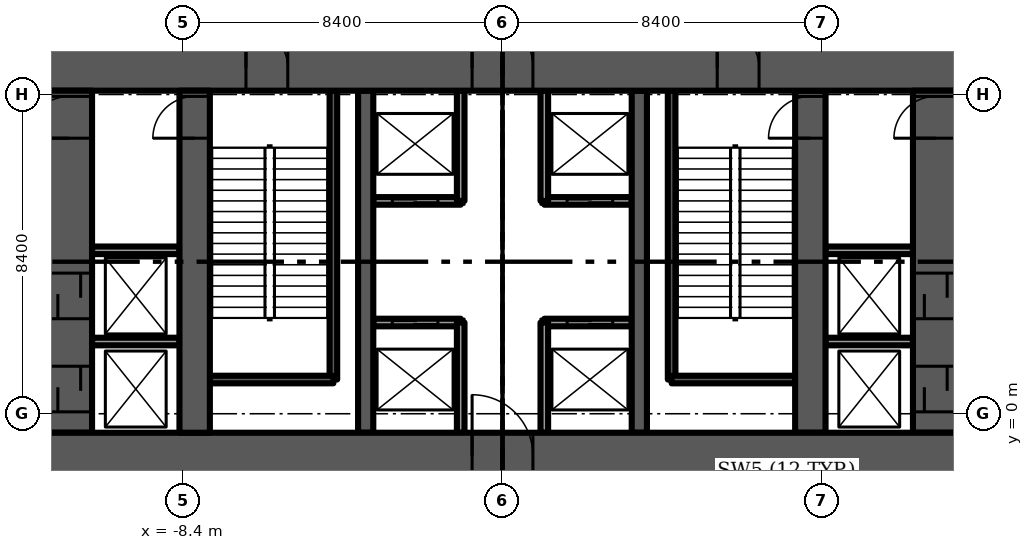
"""IFC4 building model, lengths in metres.
Left out: names, types, materials, properties, quantities, classifications, styles, units other than length and angle.
Written with IfcOpenShell. Run it as: python <this file> out.ifc"""

import sys

from ifc_helpers import new_model, si_unit, direction, frame, frame_2d, origin, place, context, subcontext, project, spatial, rectangle, extrude, element, fill, save


model = new_model("IFC4")
c1 = context("Model", 3, precision=1e-05, world=origin(), true_north=direction((0.0, 1.0)))
c2 = subcontext(c1, "Body", "Model", "MODEL_VIEW")
j1 = project(units=[si_unit("LENGTHUNIT", "METRE"), si_unit("PLANEANGLEUNIT", "RADIAN")], contexts=[c1])
p1 = place(None, origin())
s1 = spatial("IfcSite", under=j1, at=p1, CompositionType="ELEMENT")
p2 = place(p1, origin())
s2 = spatial("IfcBuilding", under=s1, at=p2, CompositionType="ELEMENT")
p3 = place(p2, origin())
s3 = spatial("IfcBuildingStorey", under=s2, at=p3, CompositionType="ELEMENT", Elevation=0.0)
p4 = place(p3, frame((-12.0, -1.1, -0.35), z_axis=(0.0, 0.0, 1.0), x_axis=(1.0, 0.0, 0.0)))
e1 = element("IfcWall", 1, at=p4, inside=s3, PredefinedType="SHEAR", context=c2, shape_type="SweptSolid", body=[
    extrude(rectangle(XDim=24.0, YDim=1.2, at=frame_2d((12.0, 0.0))), origin(), (0.0, 0.0, 1.0), 6.0),
])
p5 = place(p4, frame((11.2, 0.0, 0.0)))
e2 = element("IfcOpeningElement", 2, at=p5, cuts=e1, PredefinedType="OPENING", context=c2, shape_type="SweptSolid", body=[
    extrude(rectangle(XDim=1.6, YDim=2.1, at=frame_2d((0.8, 1.05))), frame((0.0, 0.6, 0.0), z_axis=(0.0, -1.0, 0.0), x_axis=(1.0, 0.0, 0.0)), (0.0, 0.0, 1.0), 1.2),
])
p6 = place(p3, frame((-12.0, 9.1, -0.35), z_axis=(0.0, 0.0, 1.0), x_axis=(1.0, 0.0, 0.0)))
e3 = element("IfcWall", 3, at=p6, inside=s3, PredefinedType="SHEAR", context=c2, shape_type="SweptSolid", body=[
    extrude(rectangle(XDim=24.0, YDim=1.2, at=frame_2d((12.0, 0.0))), origin(), (0.0, 0.0, 1.0), 6.0),
])
p7 = place(p6, frame((11.2, 0.0, 0.0)))
e4 = element("IfcOpeningElement", 4, at=p7, cuts=e3, PredefinedType="OPENING", context=c2, shape_type="SweptSolid", body=[
    extrude(rectangle(XDim=1.6, YDim=2.1, at=frame_2d((0.8, 1.05))), frame((0.0, 0.6, 0.0), z_axis=(0.0, -1.0, 0.0), x_axis=(1.0, 0.0, 0.0)), (0.0, 0.0, 1.0), 1.2),
])
p8 = place(p6, frame((5.25, 0.0, 0.0)))
e5 = element("IfcOpeningElement", 5, at=p8, cuts=e3, PredefinedType="OPENING", context=c2, shape_type="SweptSolid", body=[
    extrude(rectangle(XDim=1.1, YDim=2.1, at=frame_2d((0.55, 1.05))), frame((0.0, 0.6, 0.0), z_axis=(0.0, -1.0, 0.0), x_axis=(1.0, 0.0, 0.0)), (0.0, 0.0, 1.0), 1.2),
])
p9 = place(p6, frame((17.65, 0.0, 0.0)))
e6 = element("IfcOpeningElement", 6, at=p9, cuts=e3, PredefinedType="OPENING", context=c2, shape_type="SweptSolid", body=[
    extrude(rectangle(XDim=1.1, YDim=2.1, at=frame_2d((0.55, 1.05))), frame((0.0, 0.6, 0.0), z_axis=(0.0, -1.0, 0.0), x_axis=(1.0, 0.0, 0.0)), (0.0, 0.0, 1.0), 1.2),
])
p10 = place(p3, frame((-8.1, -0.5, -0.35), z_axis=(0.0, 0.0, 1.0), x_axis=(0.0, 1.0, 0.0)))
e7 = element("IfcWall", 7, at=p10, inside=s3, PredefinedType="SHEAR", context=c2, shape_type="SweptSolid", body=[
    extrude(rectangle(XDim=9.0, YDim=0.8, at=frame_2d((4.5, 0.0))), origin(), (0.0, 0.0, 1.0), 6.0),
])
p11 = place(p10, frame((7.75, 0.0, 0.0)))
e8 = element("IfcOpeningElement", 8, at=p11, cuts=e7, PredefinedType="OPENING", context=c2, shape_type="SweptSolid", body=[
    extrude(rectangle(XDim=1.1, YDim=2.1, at=frame_2d((0.55, 1.05))), frame((0.0, 0.4, 0.0), z_axis=(0.0, -1.0, 0.0), x_axis=(1.0, 0.0, 0.0)), (0.0, 0.0, 1.0), 0.8),
])
p12 = place(p3, frame((8.1, -0.5, -0.35), z_axis=(0.0, 0.0, 1.0), x_axis=(0.0, 1.0, 0.0)))
e9 = element("IfcWall", 9, at=p12, inside=s3, PredefinedType="SHEAR", context=c2, shape_type="SweptSolid", body=[
    extrude(rectangle(XDim=9.0, YDim=0.8, at=frame_2d((4.5, 0.0))), origin(), (0.0, 0.0, 1.0), 6.0),
])
p13 = place(p12, frame((7.75, 0.0, 0.0)))
e10 = element("IfcOpeningElement", 10, at=p13, cuts=e9, PredefinedType="OPENING", context=c2, shape_type="SweptSolid", body=[
    extrude(rectangle(XDim=1.1, YDim=2.1, at=frame_2d((0.55, 1.05))), frame((0.0, 0.4, 0.0), z_axis=(0.0, -1.0, 0.0), x_axis=(1.0, 0.0, 0.0)), (0.0, 0.0, 1.0), 0.8),
])
for number, where, z_axis, x_axis in (
    (11, (-3.6, -0.5, -0.35), (0.0, 0.0, 1.0), (0.0, 1.0, 0.0)),
    (12, (3.6, -0.5, -0.35), (0.0, 0.0, 1.0), (0.0, 1.0, 0.0)),
):
    element("IfcWall", number, at=place(p3, frame(where, z_axis=z_axis, x_axis=x_axis)), inside=s3, PredefinedType="SHEAR", context=c2, shape_type="SweptSolid", body=[
        extrude(rectangle(XDim=9.0, YDim=0.4, at=frame_2d((4.5, 0.0))), origin(), (0.0, 0.0, 1.0), 6.0),
    ])
p14 = place(p3, frame((-11.4, -0.5, -0.35), z_axis=(0.0, 0.0, 1.0), x_axis=(0.0, 1.0, 0.0)))
e13 = element("IfcWall", 13, at=p14, inside=s3, PredefinedType="SHEAR", context=c2, shape_type="SweptSolid", body=[
    extrude(rectangle(XDim=9.0, YDim=1.2, at=frame_2d((4.5, 0.0))), origin(), (0.0, 0.0, 1.0), 6.0),
])
p15 = place(p14, frame((7.75, 0.0, 0.0)))
e14 = element("IfcOpeningElement", 14, at=p15, cuts=e13, PredefinedType="OPENING", context=c2, shape_type="SweptSolid", body=[
    extrude(rectangle(XDim=1.1, YDim=2.1, at=frame_2d((0.55, 1.05))), frame((0.0, 0.6, 0.0), z_axis=(0.0, -1.0, 0.0), x_axis=(1.0, 0.0, 0.0)), (0.0, 0.0, 1.0), 1.2),
])
p16 = place(p14, frame((0.55, 0.0, 0.0)))
e15 = element("IfcOpeningElement", 15, at=p16, cuts=e13, PredefinedType="OPENING", context=c2, shape_type="SweptSolid", body=[
    extrude(rectangle(XDim=1.2, YDim=2.1, at=frame_2d((0.6, 1.05))), frame((0.0, 0.6, 0.0), z_axis=(0.0, -1.0, 0.0), x_axis=(1.0, 0.0, 0.0)), (0.0, 0.0, 1.0), 1.2),
])
p17 = place(p14, frame((3.0, 0.0, 0.0)))
e16 = element("IfcOpeningElement", 16, at=p17, cuts=e13, PredefinedType="OPENING", context=c2, shape_type="SweptSolid", body=[
    extrude(rectangle(XDim=1.2, YDim=2.1, at=frame_2d((0.6, 1.05))), frame((0.0, 0.6, 0.0), z_axis=(0.0, -1.0, 0.0), x_axis=(1.0, 0.0, 0.0)), (0.0, 0.0, 1.0), 1.2),
])
p18 = place(p3, frame((11.4, -0.5, -0.35), z_axis=(0.0, 0.0, 1.0), x_axis=(0.0, 1.0, 0.0)))
e17 = element("IfcWall", 17, at=p18, inside=s3, PredefinedType="SHEAR", context=c2, shape_type="SweptSolid", body=[
    extrude(rectangle(XDim=9.0, YDim=1.2, at=frame_2d((4.5, 0.0))), origin(), (0.0, 0.0, 1.0), 6.0),
])
p19 = place(p18, frame((7.75, 0.0, 0.0)))
e18 = element("IfcOpeningElement", 18, at=p19, cuts=e17, PredefinedType="OPENING", context=c2, shape_type="SweptSolid", body=[
    extrude(rectangle(XDim=1.1, YDim=2.1, at=frame_2d((0.55, 1.05))), frame((0.0, 0.6, 0.0), z_axis=(0.0, -1.0, 0.0), x_axis=(1.0, 0.0, 0.0)), (0.0, 0.0, 1.0), 1.2),
])
p20 = place(p18, frame((0.55, 0.0, 0.0)))
e19 = element("IfcOpeningElement", 19, at=p20, cuts=e17, PredefinedType="OPENING", context=c2, shape_type="SweptSolid", body=[
    extrude(rectangle(XDim=1.2, YDim=2.1, at=frame_2d((0.6, 1.05))), frame((0.0, 0.6, 0.0), z_axis=(0.0, -1.0, 0.0), x_axis=(1.0, 0.0, 0.0)), (0.0, 0.0, 1.0), 1.2),
])
p21 = place(p18, frame((3.0, 0.0, 0.0)))
e20 = element("IfcOpeningElement", 20, at=p21, cuts=e17, PredefinedType="OPENING", context=c2, shape_type="SweptSolid", body=[
    extrude(rectangle(XDim=1.2, YDim=2.1, at=frame_2d((0.6, 1.05))), frame((0.0, 0.6, 0.0), z_axis=(0.0, -1.0, 0.0), x_axis=(1.0, 0.0, 0.0)), (0.0, 0.0, 1.0), 1.2),
])
p22 = place(p3, frame((-3.4, 2.4, 0.0), z_axis=(0.0, 0.0, 1.0), x_axis=(1.0, 0.0, 0.0)))
e21 = element("IfcWall", 21, at=p22, inside=s3, PredefinedType="PARTITIONING", context=c2, shape_type="SweptSolid", body=[
    extrude(rectangle(XDim=2.3, YDim=0.2, at=frame_2d((1.15, 0.0))), origin(), (0.0, 0.0, 1.0), 5.65),
])
p23 = place(p22, frame((0.5, 0.0, 0.0)))
e22 = element("IfcOpeningElement", 22, at=p23, cuts=e21, PredefinedType="OPENING", context=c2, shape_type="SweptSolid", body=[
    extrude(rectangle(XDim=1.2, YDim=2.1, at=frame_2d((0.6, 1.05))), frame((0.0, 0.1, 0.0), z_axis=(0.0, -1.0, 0.0), x_axis=(1.0, 0.0, 0.0)), (0.0, 0.0, 1.0), 0.2),
])
p24 = place(p3, frame((-3.4, 5.6, 0.0), z_axis=(0.0, 0.0, 1.0), x_axis=(1.0, 0.0, 0.0)))
e23 = element("IfcWall", 23, at=p24, inside=s3, PredefinedType="PARTITIONING", context=c2, shape_type="SweptSolid", body=[
    extrude(rectangle(XDim=2.3, YDim=0.2, at=frame_2d((1.15, 0.0))), origin(), (0.0, 0.0, 1.0), 5.65),
])
p25 = place(p24, frame((0.5, 0.0, 0.0)))
e24 = element("IfcOpeningElement", 24, at=p25, cuts=e23, PredefinedType="OPENING", context=c2, shape_type="SweptSolid", body=[
    extrude(rectangle(XDim=1.2, YDim=2.1, at=frame_2d((0.6, 1.05))), frame((0.0, 0.1, 0.0), z_axis=(0.0, -1.0, 0.0), x_axis=(1.0, 0.0, 0.0)), (0.0, 0.0, 1.0), 0.2),
])
p26 = place(p3, frame((1.1, 2.4, 0.0), z_axis=(0.0, 0.0, 1.0), x_axis=(1.0, 0.0, 0.0)))
e25 = element("IfcWall", 25, at=p26, inside=s3, PredefinedType="PARTITIONING", context=c2, shape_type="SweptSolid", body=[
    extrude(rectangle(XDim=2.3, YDim=0.2, at=frame_2d((1.15, 0.0))), origin(), (0.0, 0.0, 1.0), 5.65),
])
p27 = place(p26, frame((0.6, 0.0, 0.0)))
e26 = element("IfcOpeningElement", 26, at=p27, cuts=e25, PredefinedType="OPENING", context=c2, shape_type="SweptSolid", body=[
    extrude(rectangle(XDim=1.2, YDim=2.1, at=frame_2d((0.6, 1.05))), frame((0.0, 0.1, 0.0), z_axis=(0.0, -1.0, 0.0), x_axis=(1.0, 0.0, 0.0)), (0.0, 0.0, 1.0), 0.2),
])
p28 = place(p3, frame((1.1, 5.6, 0.0), z_axis=(0.0, 0.0, 1.0), x_axis=(1.0, 0.0, 0.0)))
e27 = element("IfcWall", 27, at=p28, inside=s3, PredefinedType="PARTITIONING", context=c2, shape_type="SweptSolid", body=[
    extrude(rectangle(XDim=2.3, YDim=0.2, at=frame_2d((1.15, 0.0))), origin(), (0.0, 0.0, 1.0), 5.65),
])
p29 = place(p28, frame((0.6, 0.0, 0.0)))
e28 = element("IfcOpeningElement", 28, at=p29, cuts=e27, PredefinedType="OPENING", context=c2, shape_type="SweptSolid", body=[
    extrude(rectangle(XDim=1.2, YDim=2.1, at=frame_2d((0.6, 1.05))), frame((0.0, 0.1, 0.0), z_axis=(0.0, -1.0, 0.0), x_axis=(1.0, 0.0, 0.0)), (0.0, 0.0, 1.0), 0.2),
])
for number, where, z_axis, x_axis in (
    (29, (-1.1, -0.5, 0.0), (0.0, 0.0, 1.0), (0.0, 1.0, 0.0)),
    (30, (1.1, -0.5, 0.0), (0.0, 0.0, 1.0), (0.0, 1.0, 0.0)),
    (31, (-1.1, 5.6, 0.0), (0.0, 0.0, 1.0), (0.0, 1.0, 0.0)),
    (32, (1.1, 5.6, 0.0), (0.0, 0.0, 1.0), (0.0, 1.0, 0.0)),
):
    element("IfcWall", number, at=place(p3, frame(where, z_axis=z_axis, x_axis=x_axis)), inside=s3, PredefinedType="PARTITIONING", context=c2, shape_type="SweptSolid", body=[
        extrude(rectangle(XDim=2.9, YDim=0.2, at=frame_2d((1.45, 0.0))), origin(), (0.0, 0.0, 1.0), 5.65),
    ])
p30 = place(p3, frame((-4.45, 0.9, -0.35), z_axis=(0.0, 0.0, 1.0), x_axis=(0.0, 1.0, 0.0)))
e33 = element("IfcWall", 33, at=p30, inside=s3, PredefinedType="SOLIDWALL", context=c2, shape_type="SweptSolid", body=[
    extrude(rectangle(XDim=7.6, YDim=0.2, at=frame_2d((3.8, 0.0))), origin(), (0.0, 0.0, 1.0), 6.0),
])
p31 = place(p3, frame((-7.7, 0.9, -0.35), z_axis=(0.0, 0.0, 1.0), x_axis=(1.0, 0.0, 0.0)))
e34 = element("IfcWall", 34, at=p31, inside=s3, PredefinedType="SOLIDWALL", context=c2, shape_type="SweptSolid", body=[
    extrude(rectangle(XDim=3.25, YDim=0.2, at=frame_2d((1.625, 0.0))), origin(), (0.0, 0.0, 1.0), 6.0),
])
p32 = place(p3, frame((4.45, 0.9, -0.35), z_axis=(0.0, 0.0, 1.0), x_axis=(0.0, 1.0, 0.0)))
e35 = element("IfcWall", 35, at=p32, inside=s3, PredefinedType="SOLIDWALL", context=c2, shape_type="SweptSolid", body=[
    extrude(rectangle(XDim=7.6, YDim=0.2, at=frame_2d((3.8, 0.0))), origin(), (0.0, 0.0, 1.0), 6.0),
])
p33 = place(p3, frame((4.45, 0.9, -0.35), z_axis=(0.0, 0.0, 1.0), x_axis=(1.0, 0.0, 0.0)))
e36 = element("IfcWall", 36, at=p33, inside=s3, PredefinedType="SOLIDWALL", context=c2, shape_type="SweptSolid", body=[
    extrude(rectangle(XDim=3.25, YDim=0.2, at=frame_2d((1.625, 0.0))), origin(), (0.0, 0.0, 1.0), 6.0),
])
for number, where, z_axis, x_axis in (
    (37, (-10.8, 1.9, 0.0), (0.0, 0.0, 1.0), (1.0, 0.0, 0.0)),
    (38, (-10.8, 4.3, 0.0), (0.0, 0.0, 1.0), (1.0, 0.0, 0.0)),
    (39, (8.5, 1.9, 0.0), (0.0, 0.0, 1.0), (1.0, 0.0, 0.0)),
    (40, (8.5, 4.3, 0.0), (0.0, 0.0, 1.0), (1.0, 0.0, 0.0)),
):
    element("IfcWall", number, at=place(p3, frame(where, z_axis=z_axis, x_axis=x_axis)), inside=s3, PredefinedType="PARTITIONING", context=c2, shape_type="SweptSolid", body=[
        extrude(rectangle(XDim=2.3, YDim=0.2, at=frame_2d((1.15, 0.0))), origin(), (0.0, 0.0, 1.0), 5.65),
    ])
p34 = place(p23, origin())
e41 = element("IfcDoor", 41, at=p34, inside=s3, OperationType="SLIDING_TO_LEFT", PredefinedType="DOOR", context=c2, shape_type="SweptSolid", body=[
    extrude(rectangle(XDim=1.2, YDim=2.1, at=frame_2d((0.6, 1.05))), frame((0.0, 0.025, 0.0), z_axis=(0.0, -1.0, 0.0), x_axis=(1.0, 0.0, 0.0)), (0.0, 0.0, 1.0), 0.05),
])
fill(e22, e41)
p35 = place(p27, origin())
e42 = element("IfcDoor", 42, at=p35, inside=s3, OperationType="SLIDING_TO_LEFT", PredefinedType="DOOR", context=c2, shape_type="SweptSolid", body=[
    extrude(rectangle(XDim=1.2, YDim=2.1, at=frame_2d((0.6, 1.05))), frame((0.0, 0.025, 0.0), z_axis=(0.0, -1.0, 0.0), x_axis=(1.0, 0.0, 0.0)), (0.0, 0.0, 1.0), 0.05),
])
fill(e26, e42)
p36 = place(p25, origin())
e43 = element("IfcDoor", 43, at=p36, inside=s3, OperationType="SLIDING_TO_LEFT", PredefinedType="DOOR", context=c2, shape_type="SweptSolid", body=[
    extrude(rectangle(XDim=1.2, YDim=2.1, at=frame_2d((0.6, 1.05))), frame((0.0, 0.025, 0.0), z_axis=(0.0, -1.0, 0.0), x_axis=(1.0, 0.0, 0.0)), (0.0, 0.0, 1.0), 0.05),
])
fill(e24, e43)
p37 = place(p29, origin())
e44 = element("IfcDoor", 44, at=p37, inside=s3, OperationType="SLIDING_TO_LEFT", PredefinedType="DOOR", context=c2, shape_type="SweptSolid", body=[
    extrude(rectangle(XDim=1.2, YDim=2.1, at=frame_2d((0.6, 1.05))), frame((0.0, 0.025, 0.0), z_axis=(0.0, -1.0, 0.0), x_axis=(1.0, 0.0, 0.0)), (0.0, 0.0, 1.0), 0.05),
])
fill(e28, e44)
p38 = place(p5, origin())
e45 = element("IfcDoor", 45, at=p38, inside=s3, OperationType="DOUBLE_DOOR_SINGLE_SWING", PredefinedType="DOOR", context=c2, shape_type="SweptSolid", body=[
    extrude(rectangle(XDim=1.6, YDim=2.1, at=frame_2d((0.8, 1.05))), frame((0.0, 0.025, 0.0), z_axis=(0.0, -1.0, 0.0), x_axis=(1.0, 0.0, 0.0)), (0.0, 0.0, 1.0), 0.05),
])
fill(e2, e45)
p39 = place(p7, origin())
e46 = element("IfcDoor", 46, at=p39, inside=s3, OperationType="DOUBLE_DOOR_SINGLE_SWING", PredefinedType="DOOR", context=c2, shape_type="SweptSolid", body=[
    extrude(rectangle(XDim=1.6, YDim=2.1, at=frame_2d((0.8, 1.05))), frame((0.0, 0.025, 0.0), z_axis=(0.0, -1.0, 0.0), x_axis=(1.0, 0.0, 0.0)), (0.0, 0.0, 1.0), 0.05),
])
fill(e4, e46)
p40 = place(p8, origin())
e47 = element("IfcDoor", 47, at=p40, inside=s3, OperationType="SINGLE_SWING_LEFT", PredefinedType="DOOR", context=c2, shape_type="SweptSolid", body=[
    extrude(rectangle(XDim=1.1, YDim=2.1, at=frame_2d((0.55, 1.05))), frame((0.0, 0.025, 0.0), z_axis=(0.0, -1.0, 0.0), x_axis=(1.0, 0.0, 0.0)), (0.0, 0.0, 1.0), 0.05),
])
fill(e5, e47)
p41 = place(p11, origin())
e48 = element("IfcDoor", 48, at=p41, inside=s3, OperationType="SINGLE_SWING_RIGHT", PredefinedType="DOOR", context=c2, shape_type="SweptSolid", body=[
    extrude(rectangle(XDim=1.1, YDim=2.1, at=frame_2d((0.55, 1.05))), frame((0.0, 0.025, 0.0), z_axis=(0.0, -1.0, 0.0), x_axis=(1.0, 0.0, 0.0)), (0.0, 0.0, 1.0), 0.05),
])
fill(e8, e48)
p42 = place(p9, origin())
e49 = element("IfcDoor", 49, at=p42, inside=s3, OperationType="SINGLE_SWING_RIGHT", PredefinedType="DOOR", context=c2, shape_type="SweptSolid", body=[
    extrude(rectangle(XDim=1.1, YDim=2.1, at=frame_2d((0.55, 1.05))), frame((0.0, 0.025, 0.0), z_axis=(0.0, -1.0, 0.0), x_axis=(1.0, 0.0, 0.0)), (0.0, 0.0, 1.0), 0.05),
])
fill(e6, e49)
p43 = place(p13, origin())
e50 = element("IfcDoor", 50, at=p43, inside=s3, OperationType="SINGLE_SWING_LEFT", PredefinedType="DOOR", context=c2, shape_type="SweptSolid", body=[
    extrude(rectangle(XDim=1.1, YDim=2.1, at=frame_2d((0.55, 1.05))), frame((0.0, 0.025, 0.0), z_axis=(0.0, -1.0, 0.0), x_axis=(1.0, 0.0, 0.0)), (0.0, 0.0, 1.0), 0.05),
])
fill(e10, e50)
p44 = place(p15, origin())
e51 = element("IfcDoor", 51, at=p44, inside=s3, OperationType="SINGLE_SWING_LEFT", PredefinedType="DOOR", context=c2, shape_type="SweptSolid", body=[
    extrude(rectangle(XDim=1.1, YDim=2.1, at=frame_2d((0.55, 1.05))), frame((0.0, 0.025, 0.0), z_axis=(0.0, -1.0, 0.0), x_axis=(1.0, 0.0, 0.0)), (0.0, 0.0, 1.0), 0.05),
])
fill(e14, e51)
p45 = place(p16, origin())
e52 = element("IfcDoor", 52, at=p45, inside=s3, OperationType="SLIDING_TO_LEFT", PredefinedType="DOOR", context=c2, shape_type="SweptSolid", body=[
    extrude(rectangle(XDim=1.2, YDim=2.1, at=frame_2d((0.6, 1.05))), frame((0.0, 0.025, 0.0), z_axis=(0.0, -1.0, 0.0), x_axis=(1.0, 0.0, 0.0)), (0.0, 0.0, 1.0), 0.05),
])
fill(e15, e52)
p46 = place(p17, origin())
e53 = element("IfcDoor", 53, at=p46, inside=s3, OperationType="SLIDING_TO_LEFT", PredefinedType="DOOR", context=c2, shape_type="SweptSolid", body=[
    extrude(rectangle(XDim=1.2, YDim=2.1, at=frame_2d((0.6, 1.05))), frame((0.0, 0.025, 0.0), z_axis=(0.0, -1.0, 0.0), x_axis=(1.0, 0.0, 0.0)), (0.0, 0.0, 1.0), 0.05),
])
fill(e16, e53)
p47 = place(p19, origin())
e54 = element("IfcDoor", 54, at=p47, inside=s3, OperationType="SINGLE_SWING_RIGHT", PredefinedType="DOOR", context=c2, shape_type="SweptSolid", body=[
    extrude(rectangle(XDim=1.1, YDim=2.1, at=frame_2d((0.55, 1.05))), frame((0.0, 0.025, 0.0), z_axis=(0.0, -1.0, 0.0), x_axis=(1.0, 0.0, 0.0)), (0.0, 0.0, 1.0), 0.05),
])
fill(e18, e54)
p48 = place(p20, origin())
e55 = element("IfcDoor", 55, at=p48, inside=s3, OperationType="SLIDING_TO_LEFT", PredefinedType="DOOR", context=c2, shape_type="SweptSolid", body=[
    extrude(rectangle(XDim=1.2, YDim=2.1, at=frame_2d((0.6, 1.05))), frame((0.0, 0.025, 0.0), z_axis=(0.0, -1.0, 0.0), x_axis=(1.0, 0.0, 0.0)), (0.0, 0.0, 1.0), 0.05),
])
fill(e19, e55)
p49 = place(p21, origin())
e56 = element("IfcDoor", 56, at=p49, inside=s3, OperationType="SLIDING_TO_LEFT", PredefinedType="DOOR", context=c2, shape_type="SweptSolid", body=[
    extrude(rectangle(XDim=1.2, YDim=2.1, at=frame_2d((0.6, 1.05))), frame((0.0, 0.025, 0.0), z_axis=(0.0, -1.0, 0.0), x_axis=(1.0, 0.0, 0.0)), (0.0, 0.0, 1.0), 0.05),
])
fill(e20, e56)
save(model, sys.argv[1])
